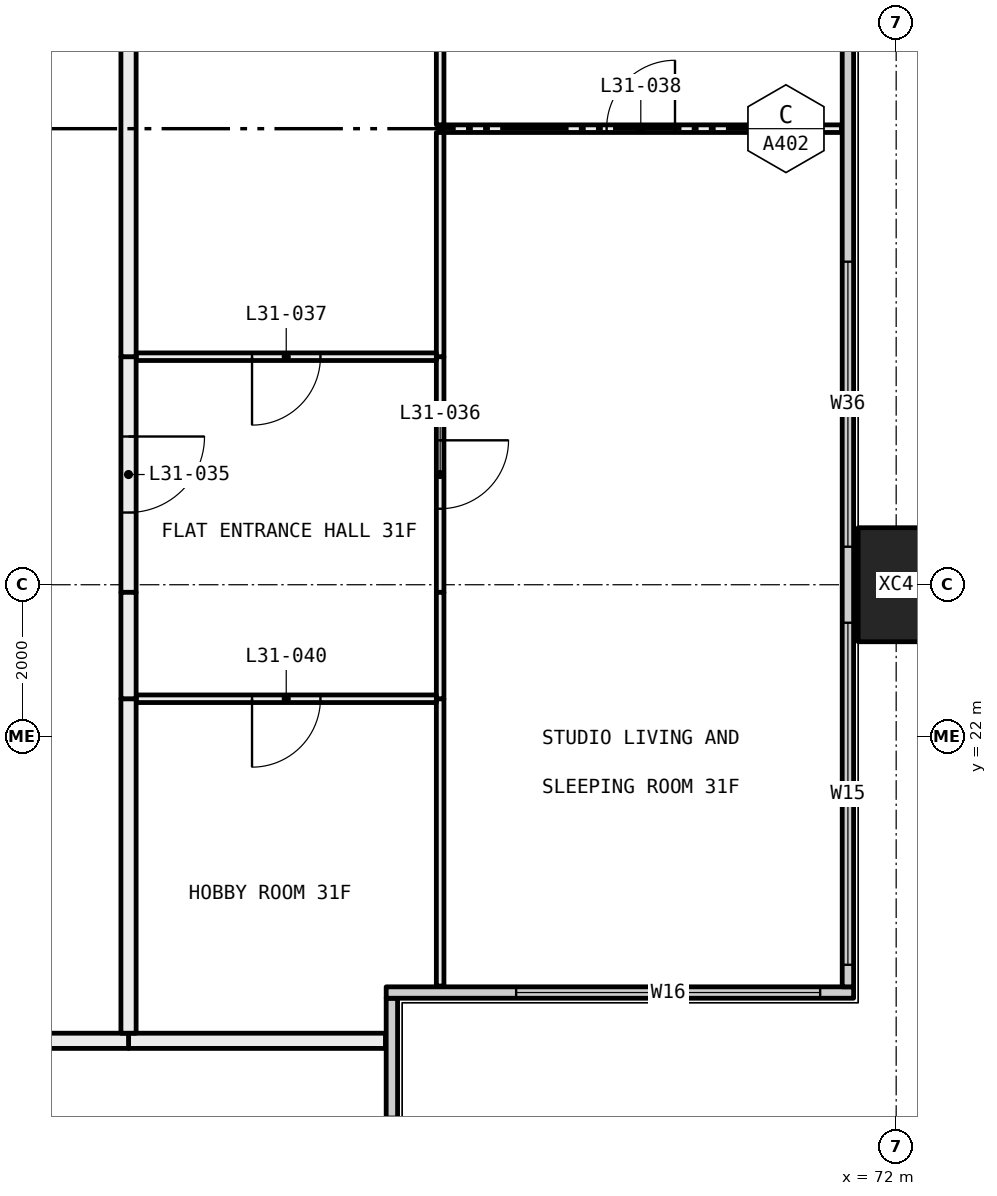
"""IFC4 building model, lengths in metres.
Left out: names, types, materials, properties, quantities, classifications, styles, units other than length and angle.
Written with IfcOpenShell. Run it as: python <this file> out.ifc"""

import sys

from ifc_helpers import new_model, si_unit, direction, frame, frame_2d, origin, origin_2d, place, context, subcontext, project, spatial, rectangle, hollow_rectangle, extrude, element, fill, save


model = new_model("IFC4")
c1 = context("Model", 3, precision=1e-05, world=origin(), true_north=direction((0.0, 1.0)))
c2 = subcontext(c1, "Body", "Model", "MODEL_VIEW")
j1 = project(units=[si_unit("LENGTHUNIT", "METRE"), si_unit("PLANEANGLEUNIT", "RADIAN")], contexts=[c1])
p1 = place(None, origin())
s1 = spatial("IfcSite", under=j1, at=p1, CompositionType="ELEMENT")
p2 = place(p1, origin())
s2 = spatial("IfcBuilding", under=s1, at=p2, CompositionType="ELEMENT")
p3 = place(p2, frame((0.0, 0.0, 120.75)))
s3 = spatial("IfcBuildingStorey", under=s2, at=p3, CompositionType="ELEMENT", Elevation=120.75)
p4 = place(p3, frame((72.0, 24.0, -0.4), z_axis=(0.0, 0.0, 1.0), x_axis=(0.0, 1.0, 0.0)))
e1 = element("IfcColumn", 1, at=p4, inside=s3, PredefinedType="COLUMN", context=c2, shape_type="SweptSolid", body=[
    extrude(hollow_rectangle(XDim=1.5, YDim=1.0, WallThickness=0.06, at=origin_2d()), origin(), (0.0, 0.0, 1.0), 3.45),
])
p5 = place(p3, frame((65.365, 12.71, 0.0), z_axis=(0.0, 0.0, 1.0), x_axis=(0.0, 1.0, 0.0)))
e2 = element("IfcWall", 2, at=p5, inside=s3, PredefinedType="ELEMENTEDWALL", context=c2, shape_type="SweptSolid", body=[
    extrude(rectangle(XDim=5.85, YDim=0.15, at=frame_2d((2.925, 0.0))), origin(), (0.0, 0.0, 1.0), 3.05),
])
p6 = place(p5, frame((0.29, 0.0, 0.45)))
e3 = element("IfcOpeningElement", 3, at=p6, cuts=e2, PredefinedType="OPENING", context=c2, shape_type="SweptSolid", body=[
    extrude(rectangle(XDim=4.0, YDim=2.55, at=frame_2d((2.0, 1.275))), frame((0.0, 0.085, 0.0), z_axis=(0.0, -1.0, 0.0), x_axis=(1.0, 0.0, 0.0)), (0.0, 0.0, 1.0), 0.17),
])
p7 = place(p3, frame((65.29, 18.635, 0.0), z_axis=(0.0, 0.0, 1.0), x_axis=(1.0, 0.0, 0.0)))
e4 = element("IfcWall", 4, at=p7, inside=s3, PredefinedType="ELEMENTEDWALL", context=c2, shape_type="SweptSolid", body=[
    extrude(rectangle(XDim=6.15, YDim=0.15, at=frame_2d((3.075, 0.0))), origin(), (0.0, 0.0, 1.0), 3.05),
])
p8 = place(p7, frame((1.71, 0.0, 0.45)))
e5 = element("IfcOpeningElement", 5, at=p8, cuts=e4, PredefinedType="OPENING", context=c2, shape_type="SweptSolid", body=[
    extrude(rectangle(XDim=4.0, YDim=2.55, at=frame_2d((2.0, 1.275))), frame((0.0, 0.085, 0.0), z_axis=(0.0, -1.0, 0.0), x_axis=(1.0, 0.0, 0.0)), (0.0, 0.0, 1.0), 0.17),
])
p9 = place(p3, frame((71.365, 18.71, 0.0), z_axis=(0.0, 0.0, 1.0), x_axis=(0.0, 1.0, 0.0)))
e6 = element("IfcWall", 6, at=p9, inside=s3, PredefinedType="ELEMENTEDWALL", context=c2, shape_type="SweptSolid", body=[
    extrude(rectangle(XDim=22.58, YDim=0.15, at=frame_2d((11.29, 0.0))), origin(), (0.0, 0.0, 1.0), 3.05),
])
p10 = place(p9, frame((0.29, 0.0, 0.45)))
e7 = element("IfcOpeningElement", 7, at=p10, cuts=e6, PredefinedType="OPENING", context=c2, shape_type="SweptSolid", body=[
    extrude(rectangle(XDim=4.5, YDim=2.55, at=frame_2d((2.25, 1.275))), frame((0.0, 0.085, 0.0), z_axis=(0.0, -1.0, 0.0), x_axis=(1.0, 0.0, 0.0)), (0.0, 0.0, 1.0), 0.17),
])
p11 = place(p9, frame((5.79, 0.0, 0.45)))
e8 = element("IfcOpeningElement", 8, at=p11, cuts=e6, PredefinedType="OPENING", context=c2, shape_type="SweptSolid", body=[
    extrude(rectangle(XDim=3.75, YDim=2.55, at=frame_2d((1.875, 1.275))), frame((0.0, 0.085, 0.0), z_axis=(0.0, -1.0, 0.0), x_axis=(1.0, 0.0, 0.0)), (0.0, 0.0, 1.0), 0.17),
])
p12 = place(p9, frame((13.04, 0.0, 0.45)))
e9 = element("IfcOpeningElement", 9, at=p12, cuts=e6, PredefinedType="OPENING", context=c2, shape_type="SweptSolid", body=[
    extrude(rectangle(XDim=0.75, YDim=2.55, at=frame_2d((0.375, 1.275))), frame((0.0, 0.085, 0.0), z_axis=(0.0, -1.0, 0.0), x_axis=(1.0, 0.0, 0.0)), (0.0, 0.0, 1.0), 0.17),
])
p13 = place(p9, frame((14.79, 0.0, 0.45)))
e10 = element("IfcOpeningElement", 10, at=p13, cuts=e6, PredefinedType="OPENING", context=c2, shape_type="SweptSolid", body=[
    extrude(rectangle(XDim=2.0, YDim=2.55, at=frame_2d((1.0, 1.275))), frame((0.0, 0.085, 0.0), z_axis=(0.0, -1.0, 0.0), x_axis=(1.0, 0.0, 0.0)), (0.0, 0.0, 1.0), 0.17),
])
p14 = place(p9, frame((17.79, 0.0, 0.45)))
e11 = element("IfcOpeningElement", 11, at=p14, cuts=e6, PredefinedType="OPENING", context=c2, shape_type="SweptSolid", body=[
    extrude(rectangle(XDim=4.5, YDim=2.55, at=frame_2d((2.25, 1.275))), frame((0.0, 0.085, 0.0), z_axis=(0.0, -1.0, 0.0), x_axis=(1.0, 0.0, 0.0)), (0.0, 0.0, 1.0), 0.17),
])
p15 = place(p3, frame((65.28, 18.0, 0.0), z_axis=(0.0, 0.0, 1.0), x_axis=(-1.0, 0.0, 0.0)))
e12 = element("IfcWall", 12, at=p15, inside=s3, PredefinedType="PARTITIONING", context=c2, shape_type="SweptSolid", body=[
    extrude(rectangle(XDim=3.38, YDim=0.2, at=frame_2d((1.69, 0.0))), origin(), (0.0, 0.0, 1.0), 3.05),
])
p16 = place(p3, frame((61.9, 18.0, 0.0), z_axis=(0.0, 0.0, 1.0), x_axis=(-1.0, 0.0, 0.0)))
e13 = element("IfcWall", 13, at=p16, inside=s3, PredefinedType="PARTITIONING", context=c2, shape_type="SweptSolid", body=[
    extrude(rectangle(XDim=7.9, YDim=0.2, at=frame_2d((3.95, 0.0))), origin(), (0.0, 0.0, 1.0), 3.05),
])
p17 = place(p3, frame((71.28, 30.0, 0.0), z_axis=(0.0, 0.0, 1.0), x_axis=(-1.0, 0.0, 0.0)))
e14 = element("IfcWall", 14, at=p17, inside=s3, PredefinedType="PARTITIONING", context=c2, shape_type="SweptSolid", body=[
    extrude(rectangle(XDim=5.28, YDim=0.1, at=frame_2d((2.64, 0.0))), origin(), (0.0, 0.0, 1.0), 3.05),
])
p18 = place(p17, frame((2.19, 0.0, 0.0)))
e15 = element("IfcOpeningElement", 15, at=p18, cuts=e14, PredefinedType="OPENING", context=c2, shape_type="SweptSolid", body=[
    extrude(rectangle(XDim=0.9, YDim=2.1, at=frame_2d((0.45, 1.05))), frame((0.0, 0.06, 0.0), z_axis=(0.0, -1.0, 0.0), x_axis=(1.0, 0.0, 0.0)), (0.0, 0.0, 1.0), 0.12),
])
p19 = place(p3, frame((66.0, 22.5, 0.0), z_axis=(0.0, 0.0, 1.0), x_axis=(0.0, -1.0, 0.0)))
e16 = element("IfcWall", 16, at=p19, inside=s3, PredefinedType="PARTITIONING", context=c2, shape_type="SweptSolid", body=[
    extrude(rectangle(XDim=3.78, YDim=0.1, at=frame_2d((1.89, 0.0))), origin(), (0.0, 0.0, 1.0), 3.05),
])
p20 = place(p3, frame((66.0, 27.0, 0.0), z_axis=(0.0, 0.0, 1.0), x_axis=(0.0, -1.0, 0.0)))
e17 = element("IfcWall", 17, at=p20, inside=s3, PredefinedType="PARTITIONING", context=c2, shape_type="SweptSolid", body=[
    extrude(rectangle(XDim=3.1, YDim=0.1, at=frame_2d((1.55, 0.0))), origin(), (0.0, 0.0, 1.0), 2.45),
])
p21 = place(p20, frame((1.1, 0.0, 0.0)))
e18 = element("IfcOpeningElement", 18, at=p21, cuts=e17, PredefinedType="OPENING", context=c2, shape_type="SweptSolid", body=[
    extrude(rectangle(XDim=0.9, YDim=2.1, at=frame_2d((0.45, 1.05))), frame((0.0, 0.06, 0.0), z_axis=(0.0, -1.0, 0.0), x_axis=(1.0, 0.0, 0.0)), (0.0, 0.0, 1.0), 0.12),
])
p22 = place(p3, frame((66.0, 23.9, 0.0), z_axis=(0.0, 0.0, 1.0), x_axis=(0.0, -1.0, 0.0)))
e19 = element("IfcWall", 19, at=p22, inside=s3, PredefinedType="PARTITIONING", context=c2, shape_type="SweptSolid", body=[
    extrude(rectangle(XDim=1.4, YDim=0.1, at=frame_2d((0.7, 0.0))), origin(), (0.0, 0.0, 1.0), 3.05),
])
p23 = place(p3, frame((66.0, 29.95, 0.0), z_axis=(0.0, 0.0, 1.0), x_axis=(0.0, -1.0, 0.0)))
e20 = element("IfcWall", 20, at=p23, inside=s3, PredefinedType="PARTITIONING", context=c2, shape_type="SweptSolid", body=[
    extrude(rectangle(XDim=2.95, YDim=0.1, at=frame_2d((1.475, 0.0))), origin(), (0.0, 0.0, 1.0), 3.05),
])
p24 = place(p3, frame((66.0, 35.95, 0.0), z_axis=(0.0, 0.0, 1.0), x_axis=(0.0, -1.0, 0.0)))
e21 = element("IfcWall", 21, at=p24, inside=s3, PredefinedType="PARTITIONING", context=c2, shape_type="SweptSolid", body=[
    extrude(rectangle(XDim=5.9, YDim=0.1, at=frame_2d((2.95, 0.0))), origin(), (0.0, 0.0, 1.0), 2.45),
])
p25 = place(p3, frame((65.95, 22.5, 0.0), z_axis=(0.0, 0.0, 1.0), x_axis=(-1.0, 0.0, 0.0)))
e22 = element("IfcWall", 22, at=p25, inside=s3, PredefinedType="PARTITIONING", context=c2, shape_type="SweptSolid", body=[
    extrude(rectangle(XDim=3.95, YDim=0.1, at=frame_2d((1.975, 0.0))), origin(), (0.0, 0.0, 1.0), 3.05),
])
p26 = place(p25, frame((1.525, 0.0, 0.0)))
e23 = element("IfcOpeningElement", 23, at=p26, cuts=e22, PredefinedType="OPENING", context=c2, shape_type="SweptSolid", body=[
    extrude(rectangle(XDim=0.9, YDim=2.1, at=frame_2d((0.45, 1.05))), frame((0.0, 0.06, 0.0), z_axis=(0.0, -1.0, 0.0), x_axis=(1.0, 0.0, 0.0)), (0.0, 0.0, 1.0), 0.12),
])
p27 = place(p3, frame((61.9, 22.5, 0.0), z_axis=(0.0, 0.0, 1.0), x_axis=(0.0, -1.0, 0.0)))
e24 = element("IfcWall", 24, at=p27, inside=s3, PredefinedType="PARTITIONING", context=c2, shape_type="SweptSolid", body=[
    extrude(rectangle(XDim=4.4, YDim=0.2, at=frame_2d((2.2, 0.0))), origin(), (0.0, 0.0, 1.0), 3.05),
])
p28 = place(p3, frame((65.95, 27.0, 0.0), z_axis=(0.0, 0.0, 1.0), x_axis=(-1.0, 0.0, 0.0)))
e25 = element("IfcWall", 25, at=p28, inside=s3, PredefinedType="PARTITIONING", context=c2, shape_type="SweptSolid", body=[
    extrude(rectangle(XDim=3.95, YDim=0.1, at=frame_2d((1.975, 0.0))), origin(), (0.0, 0.0, 1.0), 3.05),
])
p29 = place(p28, frame((1.525, 0.0, 0.0)))
e26 = element("IfcOpeningElement", 26, at=p29, cuts=e25, PredefinedType="OPENING", context=c2, shape_type="SweptSolid", body=[
    extrude(rectangle(XDim=0.9, YDim=2.1, at=frame_2d((0.45, 1.05))), frame((0.0, 0.06, 0.0), z_axis=(0.0, -1.0, 0.0), x_axis=(1.0, 0.0, 0.0)), (0.0, 0.0, 1.0), 0.12),
])
p30 = place(p3, frame((61.9, 27.0, 0.0), z_axis=(0.0, 0.0, 1.0), x_axis=(0.0, -1.0, 0.0)))
e27 = element("IfcWall", 27, at=p30, inside=s3, PredefinedType="PARTITIONING", context=c2, shape_type="SweptSolid", body=[
    extrude(rectangle(XDim=3.1, YDim=0.2, at=frame_2d((1.55, 0.0))), origin(), (0.0, 0.0, 1.0), 2.45),
])
p31 = place(p30, frame((1.05, 0.0, 0.0)))
e28 = element("IfcOpeningElement", 28, at=p31, cuts=e27, PredefinedType="OPENING", context=c2, shape_type="SweptSolid", body=[
    extrude(rectangle(XDim=1.0, YDim=2.1, at=frame_2d((0.5, 1.05))), frame((0.0, 0.11, 0.0), z_axis=(0.0, -1.0, 0.0), x_axis=(1.0, 0.0, 0.0)), (0.0, 0.0, 1.0), 0.22),
])
p32 = place(p3, frame((61.9, 23.9, 0.0), z_axis=(0.0, 0.0, 1.0), x_axis=(0.0, -1.0, 0.0)))
e29 = element("IfcWall", 29, at=p32, inside=s3, PredefinedType="PARTITIONING", context=c2, shape_type="SweptSolid", body=[
    extrude(rectangle(XDim=1.4, YDim=0.2, at=frame_2d((0.7, 0.0))), origin(), (0.0, 0.0, 1.0), 3.05),
])
p33 = place(p3, frame((61.9, 35.9, 0.0), z_axis=(0.0, 0.0, 1.0), x_axis=(0.0, -1.0, 0.0)))
e30 = element("IfcWall", 30, at=p33, inside=s3, PredefinedType="PARTITIONING", context=c2, shape_type="SweptSolid", body=[
    extrude(rectangle(XDim=8.9, YDim=0.2, at=frame_2d((4.45, 0.0))), origin(), (0.0, 0.0, 1.0), 3.05),
])
p34 = place(p8, origin())
e31 = element("IfcWindow", 31, at=p34, inside=s3, PartitioningType="SINGLE_PANEL", PredefinedType="WINDOW", context=c2, shape_type="SweptSolid", body=[
    extrude(rectangle(XDim=4.0, YDim=2.55, at=frame_2d((2.0, 1.275))), frame((0.0, 0.03, 0.0), z_axis=(0.0, -1.0, 0.0), x_axis=(1.0, 0.0, 0.0)), (0.0, 0.0, 1.0), 0.06),
])
fill(e5, e31)
p35 = place(p10, origin())
e32 = element("IfcWindow", 32, at=p35, inside=s3, PartitioningType="SINGLE_PANEL", PredefinedType="WINDOW", context=c2, shape_type="SweptSolid", body=[
    extrude(rectangle(XDim=4.5, YDim=2.55, at=frame_2d((2.25, 1.275))), frame((0.0, 0.03, 0.0), z_axis=(0.0, -1.0, 0.0), x_axis=(1.0, 0.0, 0.0)), (0.0, 0.0, 1.0), 0.06),
])
fill(e7, e32)
p36 = place(p11, origin())
e33 = element("IfcWindow", 33, at=p36, inside=s3, PartitioningType="SINGLE_PANEL", PredefinedType="WINDOW", context=c2, shape_type="SweptSolid", body=[
    extrude(rectangle(XDim=3.75, YDim=2.55, at=frame_2d((1.875, 1.275))), frame((0.0, 0.03, 0.0), z_axis=(0.0, -1.0, 0.0), x_axis=(1.0, 0.0, 0.0)), (0.0, 0.0, 1.0), 0.06),
])
fill(e8, e33)
p37 = place(p31, origin())
e34 = element("IfcDoor", 34, at=p37, inside=s3, OperationType="SINGLE_SWING_RIGHT", PredefinedType="DOOR", context=c2, shape_type="SweptSolid", body=[
    extrude(rectangle(XDim=1.0, YDim=2.1, at=frame_2d((0.5, 1.05))), frame((0.0, 0.025, 0.0), z_axis=(0.0, -1.0, 0.0), x_axis=(1.0, 0.0, 0.0)), (0.0, 0.0, 1.0), 0.05),
])
fill(e28, e34)
p38 = place(p21, origin())
e35 = element("IfcDoor", 35, at=p38, inside=s3, OperationType="SINGLE_SWING_RIGHT", PredefinedType="DOOR", context=c2, shape_type="SweptSolid", body=[
    extrude(rectangle(XDim=0.9, YDim=2.1, at=frame_2d((0.45, 1.05))), frame((0.0, 0.025, 0.0), z_axis=(0.0, -1.0, 0.0), x_axis=(1.0, 0.0, 0.0)), (0.0, 0.0, 1.0), 0.05),
])
fill(e18, e35)
p39 = place(p29, origin())
e36 = element("IfcDoor", 36, at=p39, inside=s3, OperationType="SINGLE_SWING_LEFT", PredefinedType="DOOR", context=c2, shape_type="SweptSolid", body=[
    extrude(rectangle(XDim=0.9, YDim=2.1, at=frame_2d((0.45, 1.05))), frame((0.0, 0.025, 0.0), z_axis=(0.0, -1.0, 0.0), x_axis=(1.0, 0.0, 0.0)), (0.0, 0.0, 1.0), 0.05),
])
fill(e26, e36)
p40 = place(p18, frame((0.9, 0.0, 0.0), x_axis=(-1.0, 0.0, 0.0)))
e37 = element("IfcDoor", 37, at=p40, inside=s3, OperationType="SINGLE_SWING_LEFT", PredefinedType="DOOR", context=c2, shape_type="SweptSolid", body=[
    extrude(rectangle(XDim=0.9, YDim=2.1, at=frame_2d((0.45, 1.05))), frame((0.0, 0.025, 0.0), z_axis=(0.0, -1.0, 0.0), x_axis=(1.0, 0.0, 0.0)), (0.0, 0.0, 1.0), 0.05),
])
fill(e15, e37)
p41 = place(p26, origin())
e38 = element("IfcDoor", 38, at=p41, inside=s3, OperationType="SINGLE_SWING_LEFT", PredefinedType="DOOR", context=c2, shape_type="SweptSolid", body=[
    extrude(rectangle(XDim=0.9, YDim=2.1, at=frame_2d((0.45, 1.05))), frame((0.0, 0.025, 0.0), z_axis=(0.0, -1.0, 0.0), x_axis=(1.0, 0.0, 0.0)), (0.0, 0.0, 1.0), 0.05),
])
fill(e23, e38)
save(model, sys.argv[1])
